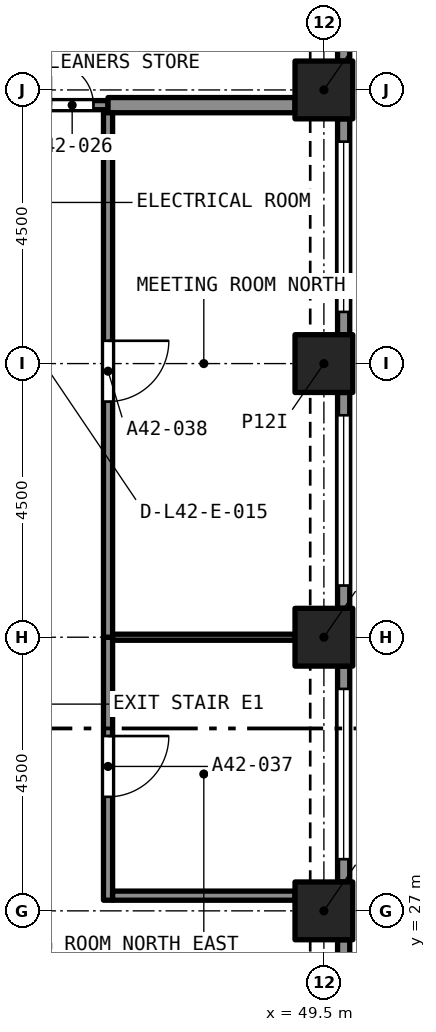
"""IFC4 building model, lengths in metres.
Left out: names, types, materials, properties, quantities, classifications, styles, units other than length and angle.
Written with IfcOpenShell. Run it as: python <this file> out.ifc"""

import sys

from ifc_helpers import new_model, si_unit, direction, frame, frame_2d, origin, origin_2d, place, context, subcontext, project, spatial, rectangle, extrude, element, fill, save


model = new_model("IFC4")
c1 = context("Model", 3, precision=1e-05, world=origin(), true_north=direction((0.0, 1.0)))
c2 = subcontext(c1, "Body", "Model", "MODEL_VIEW")
j1 = project(units=[si_unit("LENGTHUNIT", "METRE"), si_unit("PLANEANGLEUNIT", "RADIAN")], contexts=[c1])
p1 = place(None, origin())
s1 = spatial("IfcSite", under=j1, at=p1, CompositionType="ELEMENT")
p2 = place(p1, origin())
s2 = spatial("IfcBuilding", under=s1, at=p2, CompositionType="ELEMENT")
p3 = place(p2, frame((0.0, 0.0, 150.6)))
s3 = spatial("IfcBuildingStorey", under=s2, at=p3, CompositionType="ELEMENT", Elevation=150.6)
for number, where, z_axis, x_axis in (
    (1, (49.5, 27.0, 0.0), (0.0, 0.0, 1.0), (1.0, 0.0, 0.0)),
    (2, (49.5, 31.5, 0.0), (0.0, 0.0, 1.0), (1.0, 0.0, 0.0)),
    (3, (49.5, 36.0, 0.0), (0.0, 0.0, 1.0), (1.0, 0.0, 0.0)),
    (4, (49.5, 40.5, 0.0), (0.0, 0.0, 1.0), (1.0, 0.0, 0.0)),
):
    element("IfcColumn", number, at=place(p3, frame(where, z_axis=z_axis, x_axis=x_axis)), inside=s3, PredefinedType="COLUMN", context=c2, shape_type="SweptSolid", body=[
        extrude(rectangle(XDim=0.95, YDim=0.95, at=origin_2d()), origin(), (0.0, 0.0, 1.0), 4.4),
    ])
p4 = place(p3, frame((49.825, 26.525, 0.0), z_axis=(0.0, 0.0, 1.0), x_axis=(0.0, -1.0, 0.0)))
e5 = element("IfcWall", 5, at=p4, inside=s3, PredefinedType="SOLIDWALL", context=c2, shape_type="SweptSolid", body=[
    extrude(rectangle(XDim=3.55, YDim=0.2, at=frame_2d((1.775, 0.0))), origin(), (0.0, 0.0, 1.0), 4.4),
])
p5 = place(p4, frame((0.375, 0.0, 0.45)))
e6 = element("IfcOpeningElement", 6, at=p5, cuts=e5, PredefinedType="OPENING", context=c2, shape_type="SweptSolid", body=[
    extrude(rectangle(XDim=2.8, YDim=2.55, at=frame_2d((1.4, 1.275))), frame((0.0, 0.11, 0.0), z_axis=(0.0, -1.0, 0.0), x_axis=(1.0, 0.0, 0.0)), (0.0, 0.0, 1.0), 0.22),
])
p6 = place(p3, frame((49.825, 31.025, 0.0), z_axis=(0.0, 0.0, 1.0), x_axis=(0.0, -1.0, 0.0)))
e7 = element("IfcWall", 7, at=p6, inside=s3, PredefinedType="SOLIDWALL", context=c2, shape_type="SweptSolid", body=[
    extrude(rectangle(XDim=3.55, YDim=0.2, at=frame_2d((1.775, 0.0))), origin(), (0.0, 0.0, 1.0), 4.4),
])
p7 = place(p6, frame((0.375, 0.0, 0.45)))
e8 = element("IfcOpeningElement", 8, at=p7, cuts=e7, PredefinedType="OPENING", context=c2, shape_type="SweptSolid", body=[
    extrude(rectangle(XDim=2.8, YDim=2.55, at=frame_2d((1.4, 1.275))), frame((0.0, 0.11, 0.0), z_axis=(0.0, -1.0, 0.0), x_axis=(1.0, 0.0, 0.0)), (0.0, 0.0, 1.0), 0.22),
])
p8 = place(p3, frame((49.825, 35.525, 0.0), z_axis=(0.0, 0.0, 1.0), x_axis=(0.0, -1.0, 0.0)))
e9 = element("IfcWall", 9, at=p8, inside=s3, PredefinedType="SOLIDWALL", context=c2, shape_type="SweptSolid", body=[
    extrude(rectangle(XDim=3.55, YDim=0.2, at=frame_2d((1.775, 0.0))), origin(), (0.0, 0.0, 1.0), 4.4),
])
p9 = place(p8, frame((0.375, 0.0, 0.45)))
e10 = element("IfcOpeningElement", 10, at=p9, cuts=e9, PredefinedType="OPENING", context=c2, shape_type="SweptSolid", body=[
    extrude(rectangle(XDim=2.8, YDim=2.55, at=frame_2d((1.4, 1.275))), frame((0.0, 0.11, 0.0), z_axis=(0.0, -1.0, 0.0), x_axis=(1.0, 0.0, 0.0)), (0.0, 0.0, 1.0), 0.22),
])
p10 = place(p3, frame((49.825, 40.025, 0.0), z_axis=(0.0, 0.0, 1.0), x_axis=(0.0, -1.0, 0.0)))
e11 = element("IfcWall", 11, at=p10, inside=s3, PredefinedType="SOLIDWALL", context=c2, shape_type="SweptSolid", body=[
    extrude(rectangle(XDim=3.55, YDim=0.2, at=frame_2d((1.775, 0.0))), origin(), (0.0, 0.0, 1.0), 4.4),
])
p11 = place(p10, frame((0.375, 0.0, 0.45)))
e12 = element("IfcOpeningElement", 12, at=p11, cuts=e11, PredefinedType="OPENING", context=c2, shape_type="SweptSolid", body=[
    extrude(rectangle(XDim=2.8, YDim=2.55, at=frame_2d((1.4, 1.275))), frame((0.0, 0.11, 0.0), z_axis=(0.0, -1.0, 0.0), x_axis=(1.0, 0.0, 0.0)), (0.0, 0.0, 1.0), 0.22),
])
p12 = place(p3, frame((49.825, 44.525, 0.0), z_axis=(0.0, 0.0, 1.0), x_axis=(0.0, -1.0, 0.0)))
e13 = element("IfcWall", 13, at=p12, inside=s3, PredefinedType="SOLIDWALL", context=c2, shape_type="SweptSolid", body=[
    extrude(rectangle(XDim=3.55, YDim=0.2, at=frame_2d((1.775, 0.0))), origin(), (0.0, 0.0, 1.0), 4.4),
])
p13 = place(p12, frame((0.375, 0.0, 0.45)))
e14 = element("IfcOpeningElement", 14, at=p13, cuts=e13, PredefinedType="OPENING", context=c2, shape_type="SweptSolid", body=[
    extrude(rectangle(XDim=2.8, YDim=2.55, at=frame_2d((1.4, 1.275))), frame((0.0, 0.11, 0.0), z_axis=(0.0, -1.0, 0.0), x_axis=(1.0, 0.0, 0.0)), (0.0, 0.0, 1.0), 0.22),
])
p14 = place(p3, frame((44.75, 40.25, 0.0), z_axis=(0.0, 0.0, 1.0), x_axis=(1.0, 0.0, 0.0)))
e15 = element("IfcWall", 15, at=p14, inside=s3, PredefinedType="PARTITIONING", context=c2, shape_type="SweptSolid", body=[
    extrude(rectangle(XDim=1.2, YDim=0.15, at=frame_2d((0.6, 0.0))), origin(), (0.0, 0.0, 1.0), 4.1),
])
p15 = place(p14, frame((0.26, 0.0, 0.0)))
e16 = element("IfcOpeningElement", 16, at=p15, cuts=e15, PredefinedType="OPENING", context=c2, shape_type="SweptSolid", body=[
    extrude(rectangle(XDim=0.7, YDim=2.1, at=frame_2d((0.35, 1.05))), frame((0.0, 0.085, 0.0), z_axis=(0.0, -1.0, 0.0), x_axis=(1.0, 0.0, 0.0)), (0.0, 0.0, 1.0), 0.17),
])
p16 = place(p3, frame((45.95, 40.25, 0.0), z_axis=(0.0, 0.0, 1.0), x_axis=(1.0, 0.0, 0.0)))
e17 = element("IfcWall", 17, at=p16, inside=s3, PredefinedType="PARTITIONING", context=c2, shape_type="SweptSolid", body=[
    extrude(rectangle(XDim=3.075, YDim=0.25, at=frame_2d((1.538, 0.0))), origin(), (0.0, 0.0, 1.0), 4.1),
])
p17 = place(p3, frame((45.95, 31.5, 0.0), z_axis=(0.0, 0.0, 1.0), x_axis=(0.0, -1.0, 0.0)))
e18 = element("IfcWall", 18, at=p17, inside=s3, PredefinedType="PARTITIONING", context=c2, shape_type="SweptSolid", body=[
    extrude(rectangle(XDim=4.325, YDim=0.15, at=frame_2d((2.163, 0.0))), origin(), (0.0, 0.0, 1.0), 4.1),
])
p18 = place(p17, frame((1.625, 0.0, 0.0)))
e19 = element("IfcOpeningElement", 19, at=p18, cuts=e18, PredefinedType="OPENING", context=c2, shape_type="SweptSolid", body=[
    extrude(rectangle(XDim=1.0, YDim=2.1, at=frame_2d((0.5, 1.05))), frame((0.0, 0.085, 0.0), z_axis=(0.0, -1.0, 0.0), x_axis=(1.0, 0.0, 0.0)), (0.0, 0.0, 1.0), 0.17),
])
p19 = place(p3, frame((46.025, 27.25, 0.0), z_axis=(0.0, 0.0, 1.0), x_axis=(1.0, 0.0, 0.0)))
e20 = element("IfcWall", 20, at=p19, inside=s3, PredefinedType="PARTITIONING", context=c2, shape_type="SweptSolid", body=[
    extrude(rectangle(XDim=3.0, YDim=0.15, at=frame_2d((1.5, 0.0))), origin(), (0.0, 0.0, 1.0), 4.1),
])
p20 = place(p3, frame((45.95, 40.125, 0.0), z_axis=(0.0, 0.0, 1.0), x_axis=(0.0, -1.0, 0.0)))
e21 = element("IfcWall", 21, at=p20, inside=s3, PredefinedType="PARTITIONING", context=c2, shape_type="SweptSolid", body=[
    extrude(rectangle(XDim=8.625, YDim=0.15, at=frame_2d((4.312, 0.0))), origin(), (0.0, 0.0, 1.0), 4.1),
])
p21 = place(p20, frame((3.75, 0.0, 0.0)))
e22 = element("IfcOpeningElement", 22, at=p21, cuts=e21, PredefinedType="OPENING", context=c2, shape_type="SweptSolid", body=[
    extrude(rectangle(XDim=1.0, YDim=2.1, at=frame_2d((0.5, 1.05))), frame((0.0, 0.085, 0.0), z_axis=(0.0, -1.0, 0.0), x_axis=(1.0, 0.0, 0.0)), (0.0, 0.0, 1.0), 0.17),
])
p22 = place(p3, frame((46.025, 31.5, 0.0), z_axis=(0.0, 0.0, 1.0), x_axis=(1.0, 0.0, 0.0)))
e23 = element("IfcWall", 23, at=p22, inside=s3, PredefinedType="PARTITIONING", context=c2, shape_type="SweptSolid", body=[
    extrude(rectangle(XDim=3.0, YDim=0.1, at=frame_2d((1.5, 0.0))), origin(), (0.0, 0.0, 1.0), 4.1),
])
p23 = place(p7, origin())
e24 = element("IfcWindow", 24, at=p23, inside=s3, PartitioningType="SINGLE_PANEL", PredefinedType="WINDOW", context=c2, shape_type="SweptSolid", body=[
    extrude(rectangle(XDim=2.8, YDim=2.55, at=frame_2d((1.4, 1.275))), frame((0.0, 0.03, 0.0), z_axis=(0.0, -1.0, 0.0), x_axis=(1.0, 0.0, 0.0)), (0.0, 0.0, 1.0), 0.06),
])
fill(e8, e24)
p24 = place(p9, origin())
e25 = element("IfcWindow", 25, at=p24, inside=s3, PartitioningType="SINGLE_PANEL", PredefinedType="WINDOW", context=c2, shape_type="SweptSolid", body=[
    extrude(rectangle(XDim=2.8, YDim=2.55, at=frame_2d((1.4, 1.275))), frame((0.0, 0.03, 0.0), z_axis=(0.0, -1.0, 0.0), x_axis=(1.0, 0.0, 0.0)), (0.0, 0.0, 1.0), 0.06),
])
fill(e10, e25)
p25 = place(p11, origin())
e26 = element("IfcWindow", 26, at=p25, inside=s3, PartitioningType="SINGLE_PANEL", PredefinedType="WINDOW", context=c2, shape_type="SweptSolid", body=[
    extrude(rectangle(XDim=2.8, YDim=2.55, at=frame_2d((1.4, 1.275))), frame((0.0, 0.03, 0.0), z_axis=(0.0, -1.0, 0.0), x_axis=(1.0, 0.0, 0.0)), (0.0, 0.0, 1.0), 0.06),
])
fill(e12, e26)
p26 = place(p15, origin())
e27 = element("IfcDoor", 27, at=p26, inside=s3, OperationType="SINGLE_SWING_RIGHT", PredefinedType="DOOR", context=c2, shape_type="SweptSolid", body=[
    extrude(rectangle(XDim=0.7, YDim=2.1, at=frame_2d((0.35, 1.05))), frame((0.0, 0.025, 0.0), z_axis=(0.0, -1.0, 0.0), x_axis=(1.0, 0.0, 0.0)), (0.0, 0.0, 1.0), 0.05),
])
fill(e16, e27)
p27 = place(p18, origin())
e28 = element("IfcDoor", 28, at=p27, inside=s3, OperationType="SINGLE_SWING_LEFT", PredefinedType="DOOR", context=c2, shape_type="SweptSolid", body=[
    extrude(rectangle(XDim=1.0, YDim=2.1, at=frame_2d((0.5, 1.05))), frame((0.0, 0.025, 0.0), z_axis=(0.0, -1.0, 0.0), x_axis=(1.0, 0.0, 0.0)), (0.0, 0.0, 1.0), 0.05),
])
fill(e19, e28)
p28 = place(p21, origin())
e29 = element("IfcDoor", 29, at=p28, inside=s3, OperationType="SINGLE_SWING_LEFT", PredefinedType="DOOR", context=c2, shape_type="SweptSolid", body=[
    extrude(rectangle(XDim=1.0, YDim=2.1, at=frame_2d((0.5, 1.05))), frame((0.0, 0.025, 0.0), z_axis=(0.0, -1.0, 0.0), x_axis=(1.0, 0.0, 0.0)), (0.0, 0.0, 1.0), 0.05),
])
fill(e22, e29)
save(model, sys.argv[1])
